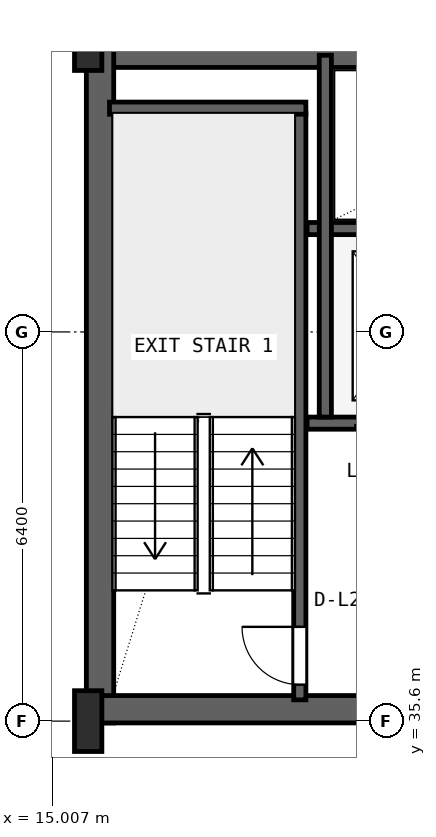
"""IFC4 building model, lengths in metres.
Left out: names, types, materials, properties, quantities, classifications, styles, units other than length and angle.
Written with IfcOpenShell. Run it as: python <this file> out.ifc"""

import sys

from ifc_helpers import new_model, si_unit, direction, frame, frame_2d, origin, origin_2d, place, context, subcontext, project, spatial, rectangle, i_section, extrude, source, transform, mapped, element, fill, save


model = new_model("IFC4")
c1 = context("Model", 3, precision=1e-05, world=origin(), true_north=direction((0.0, 1.0)))
c2 = subcontext(c1, "Body", "Model", "MODEL_VIEW")
j1 = project(units=[si_unit("LENGTHUNIT", "METRE"), si_unit("PLANEANGLEUNIT", "RADIAN")], contexts=[c1])
p1 = place(None, origin())
s1 = spatial("IfcSite", under=j1, at=p1, CompositionType="ELEMENT")
p2 = place(p1, origin())
s2 = spatial("IfcBuilding", under=s1, at=p2, CompositionType="ELEMENT")
p3 = place(p2, frame((0.0, 0.0, 94.6)))
s3 = spatial("IfcBuildingStorey", under=s2, at=p3, CompositionType="ELEMENT", Elevation=94.6)
p4 = place(p3, frame((15.6, 46.575, 0.0), z_axis=(0.0, 0.0, 1.0), x_axis=(1.0, 0.0, 0.0)))
e1 = element("IfcWall", 1, at=p4, inside=s3, PredefinedType="SHEAR", context=c2, shape_type="SweptSolid", body=[
    extrude(rectangle(XDim=36.8, YDim=0.45, at=frame_2d((18.4, 0.0))), origin(), (0.0, 0.0, 1.0), 3.52),
])
p5 = place(p3, frame((15.795, 35.57, 0.0), z_axis=(0.0, 0.0, 1.0), x_axis=(0.0, 1.0, 0.0)))
e2 = element("IfcWall", 2, at=p5, inside=s3, PredefinedType="SHEAR", context=c2, shape_type="SweptSolid", body=[
    extrude(rectangle(XDim=11.23, YDim=0.45, at=frame_2d((5.615, 0.0))), origin(), (0.0, 0.0, 1.0), 3.52),
])
p6 = place(p3, frame((15.57, 35.795, 0.0), z_axis=(0.0, 0.0, 1.0), x_axis=(1.0, 0.0, 0.0)))
e3 = element("IfcWall", 3, at=p6, inside=s3, PredefinedType="SHEAR", context=c2, shape_type="SweptSolid", body=[
    extrude(rectangle(XDim=9.23, YDim=0.45, at=frame_2d((4.615, 0.0))), origin(), (0.0, 0.0, 1.0), 3.52),
])
p7 = place(p6, frame((5.4, 0.0, 0.0)))
e4 = element("IfcOpeningElement", 4, at=p7, cuts=e3, PredefinedType="OPENING", context=c2, shape_type="SweptSolid", body=[
    extrude(rectangle(XDim=1.0, YDim=2.1, at=frame_2d((0.5, 1.05))), frame((0.0, 0.235, 0.0), z_axis=(0.0, -1.0, 0.0), x_axis=(1.0, 0.0, 0.0)), (0.0, 0.0, 1.0), 0.47),
])
m1 = source(origin(), c2, "Body", "SweptSolid", [
    extrude(i_section(OverallWidth=0.45, OverallDepth=1.0, WebThickness=0.016, FlangeThickness=0.03, FilletRadius=0.016, at=origin_2d()), origin(), (0.0, 0.0, 1.0), 3.8),
])
for number, where, z_axis, x_axis in (
    (5, (15.6, 35.6, 0.0), (0.0, 0.0, 1.0), (1.0, 0.0, 0.0)),
    (6, (15.6, 46.8, 0.0), (0.0, 0.0, 1.0), (1.0, 0.0, 0.0)),
):
    element("IfcColumn", number, at=place(p3, frame(where, z_axis=z_axis, x_axis=x_axis)), inside=s3, PredefinedType="COLUMN", context=c2, shape_type="MappedRepresentation", body=[
        mapped(m1, transform((0.0, 0.0, 0.0), x_axis=(1.0, 0.0, 0.0), y_axis=(0.0, 1.0, 0.0), z_axis=(0.0, 0.0, 1.0), scale=1.0)),
    ])
p8 = place(p3, frame((19.08, 35.95, 0.0), z_axis=(0.0, 0.0, 1.0), x_axis=(0.0, 1.0, 0.0)))
e7 = element("IfcWall", 7, at=p8, inside=s3, PredefinedType="SHEAR", context=c2, shape_type="SweptSolid", body=[
    extrude(rectangle(XDim=9.65, YDim=0.2, at=frame_2d((4.825, 0.0))), origin(), (0.0, 0.0, 1.0), 3.52),
])
p9 = place(p8, frame((0.25, 0.0, 0.0)))
e8 = element("IfcOpeningElement", 8, at=p9, cuts=e7, PredefinedType="OPENING", context=c2, shape_type="SweptSolid", body=[
    extrude(rectangle(XDim=0.95, YDim=2.1, at=frame_2d((0.475, 1.05))), frame((0.0, 0.11, 0.0), z_axis=(0.0, -1.0, 0.0), x_axis=(1.0, 0.0, 0.0)), (0.0, 0.0, 1.0), 0.22),
])
p10 = place(p3, frame((15.95, 45.68, 0.0), z_axis=(0.0, 0.0, 1.0), x_axis=(1.0, 0.0, 0.0)))
e9 = element("IfcWall", 9, at=p10, inside=s3, PredefinedType="SHEAR", context=c2, shape_type="SweptSolid", body=[
    extrude(rectangle(XDim=3.23, YDim=0.2, at=frame_2d((1.615, 0.0))), origin(), (0.0, 0.0, 1.0), 3.52),
])
p11 = place(p3, frame((19.2, 40.5, 0.0), z_axis=(0.0, 0.0, 1.0), x_axis=(1.0, 0.0, 0.0)))
e10 = element("IfcWall", 10, at=p11, inside=s3, PredefinedType="SHEAR", context=c2, shape_type="SweptSolid", body=[
    extrude(rectangle(XDim=5.52, YDim=0.2, at=frame_2d((2.76, 0.0))), origin(), (0.0, 0.0, 1.0), 3.52),
])
p12 = place(p11, frame((1.05, 0.0, 0.0)))
e11 = element("IfcOpeningElement", 11, at=p12, cuts=e10, PredefinedType="OPENING", context=c2, shape_type="SweptSolid", body=[
    extrude(rectangle(XDim=1.1, YDim=2.18, at=frame_2d((0.55, 1.09))), frame((0.0, 0.11, 0.0), z_axis=(0.0, -1.0, 0.0), x_axis=(1.0, 0.0, 0.0)), (0.0, 0.0, 1.0), 0.22),
])
p13 = place(p11, frame((3.65, 0.0, 0.0)))
e12 = element("IfcOpeningElement", 12, at=p13, cuts=e10, PredefinedType="OPENING", context=c2, shape_type="SweptSolid", body=[
    extrude(rectangle(XDim=1.1, YDim=2.18, at=frame_2d((0.55, 1.09))), frame((0.0, 0.11, 0.0), z_axis=(0.0, -1.0, 0.0), x_axis=(1.0, 0.0, 0.0)), (0.0, 0.0, 1.0), 0.22),
])
p14 = place(p3, frame((19.2, 43.7, 0.0), z_axis=(0.0, 0.0, 1.0), x_axis=(1.0, 0.0, 0.0)))
e13 = element("IfcWall", 13, at=p14, inside=s3, PredefinedType="SHEAR", context=c2, shape_type="SweptSolid", body=[
    extrude(rectangle(XDim=5.52, YDim=0.2, at=frame_2d((2.76, 0.0))), origin(), (0.0, 0.0, 1.0), 3.52),
])
p15 = place(p3, frame((19.5, 40.6, 0.0), z_axis=(0.0, 0.0, 1.0), x_axis=(0.0, 1.0, 0.0)))
e14 = element("IfcWall", 14, at=p15, inside=s3, PredefinedType="SHEAR", context=c2, shape_type="SweptSolid", body=[
    extrude(rectangle(XDim=5.95, YDim=0.2, at=frame_2d((2.975, 0.0))), origin(), (0.0, 0.0, 1.0), 3.52),
])
m2 = source(origin(), c2, "Body", "SweptSolid", [
    extrude(rectangle(XDim=0.95, YDim=2.1, at=frame_2d((0.475, 1.05))), frame((0.0, 0.025, 0.0), z_axis=(0.0, -1.0, 0.0), x_axis=(1.0, 0.0, 0.0)), (0.0, 0.0, 1.0), 0.05),
])
p16 = place(p9, origin())
e15 = element("IfcDoor", 15, at=p16, inside=s3, OperationType="SINGLE_SWING_RIGHT", PredefinedType="DOOR", context=c2, shape_type="MappedRepresentation", body=[
    mapped(m2, transform((0.0, 0.0, 0.0), x_axis=(1.0, 0.0, 0.0), y_axis=(0.0, 1.0, 0.0), z_axis=(0.0, 0.0, 1.0), scale=1.0)),
])
fill(e8, e15)
save(model, sys.argv[1])
